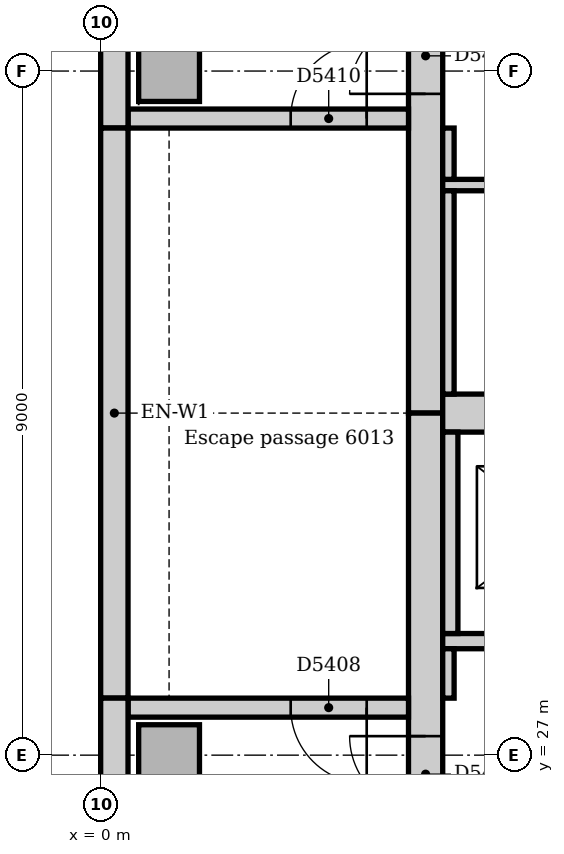
"""IFC4 building model, lengths in metres.
Left out: names, types, materials, properties, quantities, classifications, styles, units other than length and angle.
Written with IfcOpenShell. Run it as: python <this file> out.ifc"""

import sys

from ifc_helpers import new_model, si_unit, direction, frame, frame_2d, origin, origin_2d, place, context, subcontext, project, spatial, rectangle, extrude, element, fill, save


model = new_model("IFC4")
c1 = context("Model", 3, precision=1e-05, world=origin(), true_north=direction((0.0, 1.0)))
c2 = subcontext(c1, "Body", "Model", "MODEL_VIEW")
j1 = project(units=[si_unit("LENGTHUNIT", "METRE"), si_unit("PLANEANGLEUNIT", "RADIAN")], contexts=[c1])
p1 = place(None, origin())
s1 = spatial("IfcSite", under=j1, at=p1, CompositionType="ELEMENT")
p2 = place(p1, origin())
s2 = spatial("IfcBuilding", under=s1, at=p2, CompositionType="ELEMENT")
p3 = place(p2, frame((0.0, 0.0, 251.0)))
s3 = spatial("IfcBuildingStorey", under=s2, at=p3, CompositionType="ELEMENT", Elevation=251.0)
p4 = place(p3, frame((4.275, 42.0, 0.0), z_axis=(0.0, 0.0, 1.0), x_axis=(0.0, -1.0, 0.0)))
e1 = element("IfcWall", 1, at=p4, inside=s3, PredefinedType="SOLIDWALL", context=c2, shape_type="SweptSolid", body=[
    extrude(rectangle(XDim=10.5, YDim=0.45, at=frame_2d((5.25, 0.0))), origin(), (0.0, 0.0, 1.0), 4.0),
])
p5 = place(p4, frame((5.3, 0.0, 0.0)))
e2 = element("IfcOpeningElement", 2, at=p5, cuts=e1, PredefinedType="OPENING", context=c2, shape_type="SweptSolid", body=[
    extrude(rectangle(XDim=1.0, YDim=2.1, at=frame_2d((0.5, 1.05))), frame((0.0, 0.235, 0.0), z_axis=(0.0, -1.0, 0.0), x_axis=(1.0, 0.0, 0.0)), (0.0, 0.0, 1.0), 0.47),
])
p6 = place(p3, frame((4.275, 31.5, 0.0), z_axis=(0.0, 0.0, 1.0), x_axis=(0.0, -1.0, 0.0)))
e3 = element("IfcWall", 3, at=p6, inside=s3, PredefinedType="SOLIDWALL", context=c2, shape_type="SweptSolid", body=[
    extrude(rectangle(XDim=10.5, YDim=0.45, at=frame_2d((5.25, 0.0))), origin(), (0.0, 0.0, 1.0), 4.0),
])
p7 = place(p6, frame((4.25, 0.0, 0.0)))
e4 = element("IfcOpeningElement", 4, at=p7, cuts=e3, PredefinedType="OPENING", context=c2, shape_type="SweptSolid", body=[
    extrude(rectangle(XDim=1.0, YDim=2.1, at=frame_2d((0.5, 1.05))), frame((0.0, 0.235, 0.0), z_axis=(0.0, -1.0, 0.0), x_axis=(1.0, 0.0, 0.0)), (0.0, 0.0, 1.0), 0.47),
])
p8 = place(p3, frame((4.5, 31.5, 0.0), z_axis=(0.0, 0.0, 1.0), x_axis=(1.0, 0.0, 0.0)))
e5 = element("IfcWall", 5, at=p8, inside=s3, PredefinedType="SOLIDWALL", context=c2, shape_type="SweptSolid", body=[
    extrude(rectangle(XDim=18.0, YDim=0.5, at=frame_2d((9.0, 0.0))), origin(), (0.0, 0.0, 1.0), 4.0),
])
p9 = place(p3, frame((4.05, 27.625, 0.0), z_axis=(0.0, 0.0, 1.0), x_axis=(-1.0, 0.0, 0.0)))
e6 = element("IfcWall", 6, at=p9, inside=s3, PredefinedType="SOLIDWALL", context=c2, shape_type="SweptSolid", body=[
    extrude(rectangle(XDim=3.69, YDim=0.25, at=frame_2d((1.845, 0.0))), origin(), (0.0, 0.0, 1.0), 4.0),
])
p10 = place(p9, frame((0.55, 0.0, 0.0)))
e7 = element("IfcOpeningElement", 7, at=p10, cuts=e6, PredefinedType="OPENING", context=c2, shape_type="SweptSolid", body=[
    extrude(rectangle(XDim=1.0, YDim=2.1, at=frame_2d((0.5, 1.05))), frame((0.0, 0.135, 0.0), z_axis=(0.0, -1.0, 0.0), x_axis=(1.0, 0.0, 0.0)), (0.0, 0.0, 1.0), 0.27),
])
p11 = place(p3, frame((0.36, 35.375, 0.0), z_axis=(0.0, 0.0, 1.0), x_axis=(1.0, 0.0, 0.0)))
e8 = element("IfcWall", 8, at=p11, inside=s3, PredefinedType="SOLIDWALL", context=c2, shape_type="SweptSolid", body=[
    extrude(rectangle(XDim=3.69, YDim=0.25, at=frame_2d((1.845, 0.0))), origin(), (0.0, 0.0, 1.0), 4.0),
])
p12 = place(p11, frame((2.14, 0.0, 0.0)))
e9 = element("IfcOpeningElement", 9, at=p12, cuts=e8, PredefinedType="OPENING", context=c2, shape_type="SweptSolid", body=[
    extrude(rectangle(XDim=1.0, YDim=2.1, at=frame_2d((0.5, 1.05))), frame((0.0, 0.135, 0.0), z_axis=(0.0, -1.0, 0.0), x_axis=(1.0, 0.0, 0.0)), (0.0, 0.0, 1.0), 0.27),
])
for number, where, z_axis, x_axis in (
    (10, (0.9, 27.0, 0.0), (0.0, 0.0, 1.0), (1.0, 0.0, 0.0)),
    (11, (0.9, 36.0, 0.0), (0.0, 0.0, 1.0), (1.0, 0.0, 0.0)),
):
    element("IfcColumn", number, at=place(p3, frame(where, z_axis=z_axis, x_axis=x_axis)), inside=s3, PredefinedType="COLUMN", context=c2, shape_type="SweptSolid", body=[
        extrude(rectangle(XDim=0.8, YDim=0.8, at=origin_2d()), origin(), (0.0, 0.0, 1.0), 4.0),
    ])
p13 = place(p3, frame((0.18, 42.0, 0.0), z_axis=(0.0, 0.0, 1.0), x_axis=(0.0, -1.0, 0.0)))
e12 = element("IfcWall", 12, at=p13, inside=s3, PredefinedType="STANDARD", context=c2, shape_type="SweptSolid", body=[
    extrude(rectangle(XDim=6.75, YDim=0.36, at=frame_2d((3.375, 0.0))), origin(), (0.0, 0.0, 1.0), 3.85),
])
p14 = place(p3, frame((0.18, 35.25, 0.0), z_axis=(0.0, 0.0, 1.0), x_axis=(0.0, -1.0, 0.0)))
e13 = element("IfcWall", 13, at=p14, inside=s3, PredefinedType="STANDARD", context=c2, shape_type="SweptSolid", body=[
    extrude(rectangle(XDim=7.5, YDim=0.36, at=frame_2d((3.75, 0.0))), origin(), (0.0, 0.0, 1.0), 3.85),
])
p15 = place(p3, frame((0.18, 27.75, 0.0), z_axis=(0.0, 0.0, 1.0), x_axis=(0.0, -1.0, 0.0)))
e14 = element("IfcWall", 14, at=p15, inside=s3, PredefinedType="STANDARD", context=c2, shape_type="SweptSolid", body=[
    extrude(rectangle(XDim=5.507, YDim=0.36, at=frame_2d((2.754, 0.0))), origin(), (0.0, 0.0, 1.0), 3.85),
])
p16 = place(p3, frame((4.5, 28.5, 0.0), z_axis=(0.0, 0.0, 1.0), x_axis=(1.0, 0.0, 0.0)))
e15 = element("IfcWall", 15, at=p16, inside=s3, PredefinedType="PARTITIONING", context=c2, shape_type="SweptSolid", body=[
    extrude(rectangle(XDim=18.0, YDim=0.2, at=frame_2d((9.0, 0.0))), origin(), (0.0, 0.0, 1.0), 3.85),
])
p17 = place(p16, frame((0.95, 0.0, 0.0)))
e16 = element("IfcOpeningElement", 16, at=p17, cuts=e15, PredefinedType="OPENING", context=c2, shape_type="SweptSolid", body=[
    extrude(rectangle(XDim=1.1, YDim=2.1, at=frame_2d((0.55, 1.05))), frame((0.0, 0.11, 0.0), z_axis=(0.0, -1.0, 0.0), x_axis=(1.0, 0.0, 0.0)), (0.0, 0.0, 1.0), 0.22),
])
p18 = place(p16, frame((3.95, 0.0, 0.0)))
e17 = element("IfcOpeningElement", 17, at=p18, cuts=e15, PredefinedType="OPENING", context=c2, shape_type="SweptSolid", body=[
    extrude(rectangle(XDim=1.1, YDim=2.1, at=frame_2d((0.55, 1.05))), frame((0.0, 0.11, 0.0), z_axis=(0.0, -1.0, 0.0), x_axis=(1.0, 0.0, 0.0)), (0.0, 0.0, 1.0), 0.22),
])
p19 = place(p16, frame((6.95, 0.0, 0.0)))
e18 = element("IfcOpeningElement", 18, at=p19, cuts=e15, PredefinedType="OPENING", context=c2, shape_type="SweptSolid", body=[
    extrude(rectangle(XDim=1.1, YDim=2.1, at=frame_2d((0.55, 1.05))), frame((0.0, 0.11, 0.0), z_axis=(0.0, -1.0, 0.0), x_axis=(1.0, 0.0, 0.0)), (0.0, 0.0, 1.0), 0.22),
])
p20 = place(p16, frame((9.95, 0.0, 0.0)))
e19 = element("IfcOpeningElement", 19, at=p20, cuts=e15, PredefinedType="OPENING", context=c2, shape_type="SweptSolid", body=[
    extrude(rectangle(XDim=1.1, YDim=2.1, at=frame_2d((0.55, 1.05))), frame((0.0, 0.11, 0.0), z_axis=(0.0, -1.0, 0.0), x_axis=(1.0, 0.0, 0.0)), (0.0, 0.0, 1.0), 0.22),
])
p21 = place(p16, frame((12.95, 0.0, 0.0)))
e20 = element("IfcOpeningElement", 20, at=p21, cuts=e15, PredefinedType="OPENING", context=c2, shape_type="SweptSolid", body=[
    extrude(rectangle(XDim=1.1, YDim=2.1, at=frame_2d((0.55, 1.05))), frame((0.0, 0.11, 0.0), z_axis=(0.0, -1.0, 0.0), x_axis=(1.0, 0.0, 0.0)), (0.0, 0.0, 1.0), 0.22),
])
p22 = place(p16, frame((15.95, 0.0, 0.0)))
e21 = element("IfcOpeningElement", 21, at=p22, cuts=e15, PredefinedType="OPENING", context=c2, shape_type="SweptSolid", body=[
    extrude(rectangle(XDim=1.1, YDim=2.1, at=frame_2d((0.55, 1.05))), frame((0.0, 0.11, 0.0), z_axis=(0.0, -1.0, 0.0), x_axis=(1.0, 0.0, 0.0)), (0.0, 0.0, 1.0), 0.22),
])
p23 = place(p3, frame((4.6, 28.6, 0.0), z_axis=(0.0, 0.0, 1.0), x_axis=(0.0, 1.0, 0.0)))
e22 = element("IfcWall", 22, at=p23, inside=s3, PredefinedType="PARTITIONING", context=c2, shape_type="SweptSolid", body=[
    extrude(rectangle(XDim=2.65, YDim=0.2, at=frame_2d((1.325, 0.0))), origin(), (0.0, 0.0, 1.0), 3.85),
])
p24 = place(p3, frame((4.5, 34.5, 0.0), z_axis=(0.0, 0.0, 1.0), x_axis=(1.0, 0.0, 0.0)))
e23 = element("IfcWall", 23, at=p24, inside=s3, PredefinedType="PARTITIONING", context=c2, shape_type="SweptSolid", body=[
    extrude(rectangle(XDim=5.9, YDim=0.15, at=frame_2d((2.95, 0.0))), origin(), (0.0, 0.0, 1.0), 3.85),
])
p25 = place(p24, frame((1.85, 0.0, 0.0)))
e24 = element("IfcOpeningElement", 24, at=p25, cuts=e23, PredefinedType="OPENING", context=c2, shape_type="SweptSolid", body=[
    extrude(rectangle(XDim=0.9, YDim=2.1, at=frame_2d((0.45, 1.05))), frame((0.0, 0.085, 0.0), z_axis=(0.0, -1.0, 0.0), x_axis=(1.0, 0.0, 0.0)), (0.0, 0.0, 1.0), 0.17),
])
p26 = place(p24, frame((4.65, 0.0, 0.0)))
e25 = element("IfcOpeningElement", 25, at=p26, cuts=e23, PredefinedType="OPENING", context=c2, shape_type="SweptSolid", body=[
    extrude(rectangle(XDim=0.9, YDim=2.1, at=frame_2d((0.45, 1.05))), frame((0.0, 0.085, 0.0), z_axis=(0.0, -1.0, 0.0), x_axis=(1.0, 0.0, 0.0)), (0.0, 0.0, 1.0), 0.17),
])
p27 = place(p3, frame((4.575, 34.575, 0.0), z_axis=(0.0, 0.0, 1.0), x_axis=(0.0, 1.0, 0.0)))
e26 = element("IfcWall", 26, at=p27, inside=s3, PredefinedType="PARTITIONING", context=c2, shape_type="SweptSolid", body=[
    extrude(rectangle(XDim=0.675, YDim=0.15, at=frame_2d((0.338, 0.0))), origin(), (0.0, 0.0, 1.0), 3.85),
])
p28 = place(p3, frame((4.575, 31.75, 0.0), z_axis=(0.0, 0.0, 1.0), x_axis=(0.0, 1.0, 0.0)))
e27 = element("IfcWall", 27, at=p28, inside=s3, PredefinedType="PARTITIONING", context=c2, shape_type="SweptSolid", body=[
    extrude(rectangle(XDim=2.675, YDim=0.15, at=frame_2d((1.337, 0.0))), origin(), (0.0, 0.0, 1.0), 3.85),
])
p29 = place(p3, frame((4.575, 27.75, 0.0), z_axis=(0.0, 0.0, 1.0), x_axis=(0.0, 1.0, 0.0)))
e28 = element("IfcWall", 28, at=p29, inside=s3, PredefinedType="PARTITIONING", context=c2, shape_type="SweptSolid", body=[
    extrude(rectangle(XDim=0.65, YDim=0.15, at=frame_2d((0.325, 0.0))), origin(), (0.0, 0.0, 1.0), 3.85),
])
p30 = place(p7, frame((1.0, 0.0, 0.0), z_axis=(0.0, 0.0, 1.0), x_axis=(-1.0, 0.0, 0.0)))
e29 = element("IfcDoor", 29, at=p30, inside=s3, OperationType="SINGLE_SWING_RIGHT", PredefinedType="DOOR", context=c2, shape_type="SweptSolid", body=[
    extrude(rectangle(XDim=1.0, YDim=2.1, at=frame_2d((0.5, 1.05))), frame((0.0, 0.025, 0.0), z_axis=(0.0, -1.0, 0.0), x_axis=(1.0, 0.0, 0.0)), (0.0, 0.0, 1.0), 0.05),
])
fill(e4, e29)
p31 = place(p10, origin())
e30 = element("IfcDoor", 30, at=p31, inside=s3, OperationType="SINGLE_SWING_LEFT", PredefinedType="DOOR", context=c2, shape_type="SweptSolid", body=[
    extrude(rectangle(XDim=1.0, YDim=2.1, at=frame_2d((0.5, 1.05))), frame((0.0, 0.025, 0.0), z_axis=(0.0, -1.0, 0.0), x_axis=(1.0, 0.0, 0.0)), (0.0, 0.0, 1.0), 0.05),
])
fill(e7, e30)
p32 = place(p5, frame((1.0, 0.0, 0.0), z_axis=(0.0, 0.0, 1.0), x_axis=(-1.0, 0.0, 0.0)))
e31 = element("IfcDoor", 31, at=p32, inside=s3, OperationType="SINGLE_SWING_LEFT", PredefinedType="DOOR", context=c2, shape_type="SweptSolid", body=[
    extrude(rectangle(XDim=1.0, YDim=2.1, at=frame_2d((0.5, 1.05))), frame((0.0, 0.025, 0.0), z_axis=(0.0, -1.0, 0.0), x_axis=(1.0, 0.0, 0.0)), (0.0, 0.0, 1.0), 0.05),
])
fill(e2, e31)
p33 = place(p12, origin())
e32 = element("IfcDoor", 32, at=p33, inside=s3, OperationType="SINGLE_SWING_RIGHT", PredefinedType="DOOR", context=c2, shape_type="SweptSolid", body=[
    extrude(rectangle(XDim=1.0, YDim=2.1, at=frame_2d((0.5, 1.05))), frame((0.0, 0.025, 0.0), z_axis=(0.0, -1.0, 0.0), x_axis=(1.0, 0.0, 0.0)), (0.0, 0.0, 1.0), 0.05),
])
fill(e9, e32)
save(model, sys.argv[1])
